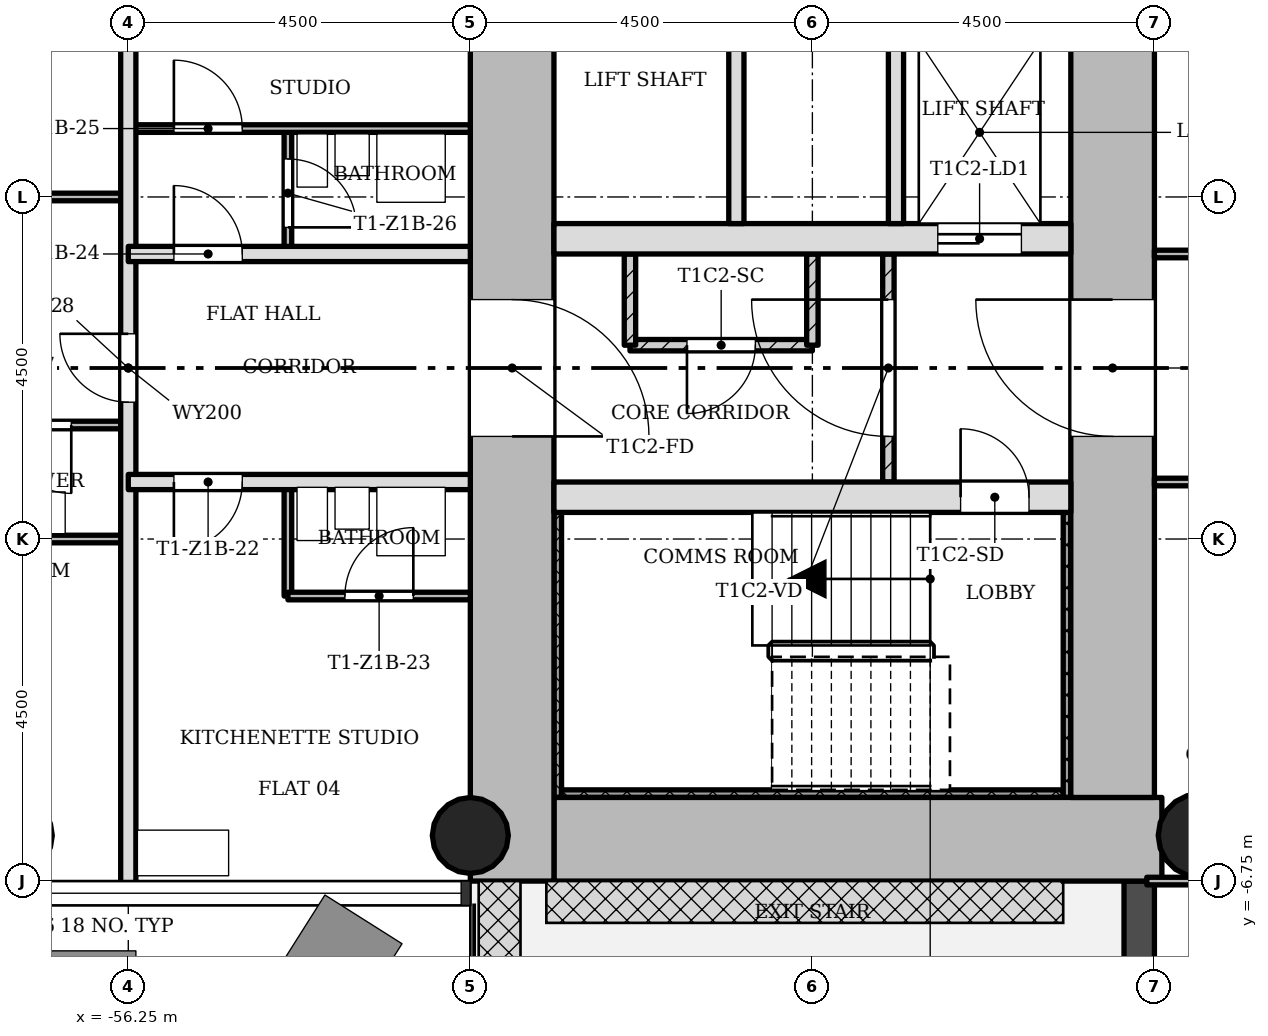
"""IFC4 building model, lengths in metres.
Left out: names, types, materials, properties, quantities, classifications, styles, units other than length and angle.
Written with IfcOpenShell. Run it as: python <this file> out.ifc"""

import sys

from ifc_helpers import new_model, si_unit, direction, frame, frame_2d, origin, origin_2d, place, context, subcontext, project, spatial, rectangle, hollow_circle, extrude, element, fill, save


model = new_model("IFC4")
c1 = context("Model", 3, precision=1e-05, world=origin(), true_north=direction((0.0, 1.0)))
c2 = subcontext(c1, "Body", "Model", "MODEL_VIEW")
j1 = project(units=[si_unit("LENGTHUNIT", "METRE"), si_unit("PLANEANGLEUNIT", "RADIAN")], contexts=[c1])
p1 = place(None, origin())
s1 = spatial("IfcSite", under=j1, at=p1, CompositionType="ELEMENT")
p2 = place(p1, origin())
s2 = spatial("IfcBuilding", under=s1, at=p2, CompositionType="ELEMENT")
p3 = place(p2, frame((0.0, 0.0, 38.1)))
s3 = spatial("IfcBuildingStorey", under=s2, at=p3, CompositionType="ELEMENT", Elevation=38.1)
p4 = place(p3, frame((-50.65, -6.2, 0.0), z_axis=(0.0, 0.0, 1.0), x_axis=(1.0, 0.0, 0.0)))
e1 = element("IfcWall", 1, at=p4, inside=s3, PredefinedType="SHEAR", context=c2, shape_type="SweptSolid", body=[
    extrude(rectangle(XDim=7.998, YDim=1.1, at=frame_2d((3.999, 0.0))), origin(), (0.0, 0.0, 1.0), 3.4),
])
p5 = place(p3, frame((-43.3, -5.65, 0.0), z_axis=(0.0, 0.0, 1.0), x_axis=(0.0, 1.0, 0.0)))
e2 = element("IfcWall", 2, at=p5, inside=s3, PredefinedType="SHEAR", context=c2, shape_type="SweptSolid", body=[
    extrude(rectangle(XDim=12.4, YDim=1.1, at=frame_2d((6.2, 0.0))), origin(), (0.0, 0.0, 1.0), 3.4),
])
p6 = place(p5, frame((4.75, 0.0, 0.0)))
e3 = element("IfcOpeningElement", 3, at=p6, cuts=e2, PredefinedType="OPENING", context=c2, shape_type="SweptSolid", body=[
    extrude(rectangle(XDim=1.8, YDim=2.1, at=frame_2d((0.9, 1.05))), frame((0.0, 0.56, 0.0), z_axis=(0.0, -1.0, 0.0), x_axis=(1.0, 0.0, 0.0)), (0.0, 0.0, 1.0), 1.12),
])
p7 = place(p3, frame((-51.2, 5.65, 0.0), z_axis=(0.0, 0.0, 1.0), x_axis=(0.0, -1.0, 0.0)))
e4 = element("IfcWall", 4, at=p7, inside=s3, PredefinedType="SHEAR", context=c2, shape_type="SweptSolid", body=[
    extrude(rectangle(XDim=12.4, YDim=1.1, at=frame_2d((6.2, 0.0))), origin(), (0.0, 0.0, 1.0), 3.4),
])
p8 = place(p7, frame((4.75, 0.0, 0.0)))
e5 = element("IfcOpeningElement", 5, at=p8, cuts=e4, PredefinedType="OPENING", context=c2, shape_type="SweptSolid", body=[
    extrude(rectangle(XDim=1.8, YDim=2.1, at=frame_2d((0.9, 1.05))), frame((0.0, 0.56, 0.0), z_axis=(0.0, -1.0, 0.0), x_axis=(1.0, 0.0, 0.0)), (0.0, 0.0, 1.0), 1.12),
])
p9 = place(p3, frame((-50.65, -1.7, 0.0), z_axis=(0.0, 0.0, 1.0), x_axis=(1.0, 0.0, 0.0)))
e6 = element("IfcWall", 6, at=p9, inside=s3, PredefinedType="SHEAR", context=c2, shape_type="SweptSolid", body=[
    extrude(rectangle(XDim=6.8, YDim=0.4, at=frame_2d((3.4, 0.0))), origin(), (0.0, 0.0, 1.0), 3.4),
])
p10 = place(p9, frame((5.35, 0.0, 0.0)))
e7 = element("IfcOpeningElement", 7, at=p10, cuts=e6, PredefinedType="OPENING", context=c2, shape_type="SweptSolid", body=[
    extrude(rectangle(XDim=0.9, YDim=2.1, at=frame_2d((0.45, 1.05))), frame((0.0, 0.21, 0.0), z_axis=(0.0, -1.0, 0.0), x_axis=(1.0, 0.0, 0.0)), (0.0, 0.0, 1.0), 0.42),
])
p11 = place(p3, frame((-50.65, 1.7, 0.0), z_axis=(0.0, 0.0, 1.0), x_axis=(1.0, 0.0, 0.0)))
e8 = element("IfcWall", 8, at=p11, inside=s3, PredefinedType="SHEAR", context=c2, shape_type="SweptSolid", body=[
    extrude(rectangle(XDim=6.8, YDim=0.4, at=frame_2d((3.4, 0.0))), origin(), (0.0, 0.0, 1.0), 3.4),
])
p12 = place(p11, frame((5.05, 0.0, 0.0)))
e9 = element("IfcOpeningElement", 9, at=p12, cuts=e8, PredefinedType="OPENING", context=c2, shape_type="SweptSolid", body=[
    extrude(rectangle(XDim=1.1, YDim=2.1, at=frame_2d((0.55, 1.05))), frame((0.0, 0.21, 0.0), z_axis=(0.0, -1.0, 0.0), x_axis=(1.0, 0.0, 0.0)), (0.0, 0.0, 1.0), 0.42),
])
p13 = place(p3, frame((-51.75, -6.15, 0.0), z_axis=(0.0, 0.0, 1.0), x_axis=(1.0, 0.0, 0.0)))
e10 = element("IfcColumn", 10, at=p13, inside=s3, PredefinedType="COLUMN", context=c2, shape_type="SweptSolid", body=[
    extrude(hollow_circle(Radius=0.5, WallThickness=0.036, at=origin_2d()), origin(), (0.0, 0.0, 1.0), 3.4),
])
p14 = place(p3, frame((-42.15, -6.15, 0.0), z_axis=(0.0, 0.0, 1.0), x_axis=(1.0, 0.0, 0.0)))
e11 = element("IfcColumn", 11, at=p14, inside=s3, PredefinedType="COLUMN", context=c2, shape_type="SweptSolid", body=[
    extrude(hollow_circle(Radius=0.55, WallThickness=0.04, at=origin_2d()), origin(), (0.0, 0.0, 1.0), 3.4),
])
p15 = place(p3, frame((-42.95, -6.75, -0.02), z_axis=(0.0, 0.0, 1.0), x_axis=(0.0, -1.0, 0.0)))
e12 = element("IfcWall", 12, at=p15, inside=s3, PredefinedType="STANDARD", context=c2, shape_type="SweptSolid", body=[
    extrude(rectangle(XDim=4.5, YDim=0.4, at=frame_2d((2.25, 0.0))), origin(), (0.0, 0.0, 1.0), 3.12),
])
p16 = place(p15, frame((1.35, 0.0, 0.02)))
e13 = element("IfcOpeningElement", 13, at=p16, cuts=e12, PredefinedType="OPENING", context=c2, shape_type="SweptSolid", body=[
    extrude(rectangle(XDim=1.8, YDim=2.1, at=frame_2d((0.9, 1.05))), frame((0.0, 0.21, 0.0), z_axis=(0.0, -1.0, 0.0), x_axis=(1.0, 0.0, 0.0)), (0.0, 0.0, 1.0), 0.42),
])
p17 = place(p3, frame((-46.25, 1.5, 0.0), z_axis=(0.0, 0.0, 1.0), x_axis=(0.0, -1.0, 0.0)))
e14 = element("IfcWall", 14, at=p17, inside=s3, PredefinedType="PARTITIONING", context=c2, shape_type="SweptSolid", body=[
    extrude(rectangle(XDim=3.0, YDim=0.15, at=frame_2d((1.5, 0.0))), origin(), (0.0, 0.0, 1.0), 3.0),
])
p18 = place(p17, frame((0.6, 0.0, 0.0)))
e15 = element("IfcOpeningElement", 15, at=p18, cuts=e14, PredefinedType="OPENING", context=c2, shape_type="SweptSolid", body=[
    extrude(rectangle(XDim=1.8, YDim=2.1, at=frame_2d((0.9, 1.05))), frame((0.0, 0.085, 0.0), z_axis=(0.0, -1.0, 0.0), x_axis=(1.0, 0.0, 0.0)), (0.0, 0.0, 1.0), 0.17),
])
for number, where, z_axis, x_axis in (
    (16, (-46.15, 5.65, 0.0), (0.0, 0.0, 1.0), (0.0, -1.0, 0.0)),
    (17, (-48.25, 5.65, 0.0), (0.0, 0.0, 1.0), (0.0, -1.0, 0.0)),
):
    element("IfcWall", number, at=place(p3, frame(where, z_axis=z_axis, x_axis=x_axis)), inside=s3, PredefinedType="SOLIDWALL", context=c2, shape_type="SweptSolid", body=[
        extrude(rectangle(XDim=3.75, YDim=0.2, at=frame_2d((1.875, 0.0))), origin(), (0.0, 0.0, 1.0), 3.0),
    ])
p19 = place(p3, frame((-47.25, 0.3, 0.0), z_axis=(0.0, 0.0, 1.0), x_axis=(-1.0, 0.0, 0.0)))
e18 = element("IfcWall", 18, at=p19, inside=s3, PredefinedType="PARTITIONING", context=c2, shape_type="SweptSolid", body=[
    extrude(rectangle(XDim=2.4, YDim=0.15, at=frame_2d((1.2, 0.0))), origin(), (0.0, 0.0, 1.0), 3.0),
])
p20 = place(p19, frame((0.75, 0.0, 0.0)))
e19 = element("IfcOpeningElement", 19, at=p20, cuts=e18, PredefinedType="OPENING", context=c2, shape_type="SweptSolid", body=[
    extrude(rectangle(XDim=0.9, YDim=2.1, at=frame_2d((0.45, 1.05))), frame((0.0, 0.085, 0.0), z_axis=(0.0, -1.0, 0.0), x_axis=(1.0, 0.0, 0.0)), (0.0, 0.0, 1.0), 0.17),
])
for number, where, z_axis, x_axis in (
    (20, (-47.25, 0.3, 0.0), (0.0, 0.0, 1.0), (0.0, 1.0, 0.0)),
    (21, (-49.65, 0.3, 0.0), (0.0, 0.0, 1.0), (0.0, 1.0, 0.0)),
):
    element("IfcWall", number, at=place(p3, frame(where, z_axis=z_axis, x_axis=x_axis)), inside=s3, PredefinedType="PARTITIONING", context=c2, shape_type="SweptSolid", body=[
        extrude(rectangle(XDim=1.2, YDim=0.15, at=frame_2d((0.6, 0.0))), origin(), (0.0, 0.0, 1.0), 3.0),
    ])
p21 = place(p3, frame((-56.25, -6.85, 0.0), z_axis=(0.0, 0.0, 1.0), x_axis=(0.0, 1.0, 0.0)))
e22 = element("IfcWall", 22, at=p21, inside=s3, PredefinedType="SOLIDWALL", context=c2, shape_type="SweptSolid", body=[
    extrude(rectangle(XDim=13.7, YDim=0.2, at=frame_2d((6.85, 0.0))), origin(), (0.0, 0.0, 1.0), 3.0),
])
p22 = place(p21, frame((6.4, 0.0, 0.0)))
e23 = element("IfcOpeningElement", 23, at=p22, cuts=e22, PredefinedType="OPENING", context=c2, shape_type="SweptSolid", body=[
    extrude(rectangle(XDim=0.9, YDim=2.1, at=frame_2d((0.45, 1.05))), frame((0.0, 0.11, 0.0), z_axis=(0.0, -1.0, 0.0), x_axis=(1.0, 0.0, 0.0)), (0.0, 0.0, 1.0), 0.22),
])
p23 = place(p3, frame((-54.15, -3.0, 0.0), z_axis=(0.0, 0.0, 1.0), x_axis=(0.0, 1.0, 0.0)))
e24 = element("IfcWall", 24, at=p23, inside=s3, PredefinedType="PARTITIONING", context=c2, shape_type="SweptSolid", body=[
    extrude(rectangle(XDim=1.5, YDim=0.1, at=frame_2d((0.75, 0.0))), origin(), (0.0, 0.0, 1.0), 3.0),
])
p24 = place(p3, frame((-54.15, 1.5, 0.0), z_axis=(0.0, 0.0, 1.0), x_axis=(0.0, 1.0, 0.0)))
e25 = element("IfcWall", 25, at=p24, inside=s3, PredefinedType="PARTITIONING", context=c2, shape_type="SweptSolid", body=[
    extrude(rectangle(XDim=1.65, YDim=0.1, at=frame_2d((0.825, 0.0))), origin(), (0.0, 0.0, 1.0), 3.0),
])
p25 = place(p24, frame((0.35, 0.0, 0.0)))
e26 = element("IfcOpeningElement", 26, at=p25, cuts=e25, PredefinedType="OPENING", context=c2, shape_type="SweptSolid", body=[
    extrude(rectangle(XDim=0.9, YDim=2.1, at=frame_2d((0.45, 1.05))), frame((0.0, 0.06, 0.0), z_axis=(0.0, -1.0, 0.0), x_axis=(1.0, 0.0, 0.0)), (0.0, 0.0, 1.0), 0.12),
])
p26 = place(p3, frame((-42.85, -6.75, 0.0), z_axis=(0.0, 0.0, 1.0), x_axis=(1.0, 0.0, 0.0)))
e27 = element("IfcWall", 27, at=p26, inside=s3, PredefinedType="PARTITIONING", context=c2, shape_type="SweptSolid", body=[
    extrude(rectangle(XDim=5.95, YDim=0.1, at=frame_2d((2.975, 0.0))), origin(), (0.0, 0.0, 1.0), 3.0),
])
p27 = place(p3, frame((-54.15, -3.0, 0.0), z_axis=(0.0, 0.0, 1.0), x_axis=(1.0, 0.0, 0.0)))
e28 = element("IfcWall", 28, at=p27, inside=s3, PredefinedType="PARTITIONING", context=c2, shape_type="SweptSolid", body=[
    extrude(rectangle(XDim=2.4, YDim=0.1, at=frame_2d((1.2, 0.0))), origin(), (0.0, 0.0, 1.0), 3.0),
])
p28 = place(p27, frame((0.75, 0.0, 0.0)))
e29 = element("IfcOpeningElement", 29, at=p28, cuts=e28, PredefinedType="OPENING", context=c2, shape_type="SweptSolid", body=[
    extrude(rectangle(XDim=0.9, YDim=2.1, at=frame_2d((0.45, 1.05))), frame((0.0, 0.06, 0.0), z_axis=(0.0, -1.0, 0.0), x_axis=(1.0, 0.0, 0.0)), (0.0, 0.0, 1.0), 0.12),
])
p29 = place(p3, frame((-60.85, -2.25, 0.0), z_axis=(0.0, 0.0, 1.0), x_axis=(1.0, 0.0, 0.0)))
e30 = element("IfcWall", 30, at=p29, inside=s3, PredefinedType="PARTITIONING", context=c2, shape_type="SweptSolid", body=[
    extrude(rectangle(XDim=4.6, YDim=0.1, at=frame_2d((2.3, 0.0))), origin(), (0.0, 0.0, 1.0), 3.0),
])
p30 = place(p29, frame((1.25, 0.0, 0.0)))
e31 = element("IfcOpeningElement", 31, at=p30, cuts=e30, PredefinedType="OPENING", context=c2, shape_type="SweptSolid", body=[
    extrude(rectangle(XDim=0.9, YDim=2.1, at=frame_2d((0.45, 1.05))), frame((0.0, 0.06, 0.0), z_axis=(0.0, -1.0, 0.0), x_axis=(1.0, 0.0, 0.0)), (0.0, 0.0, 1.0), 0.12),
])
p31 = place(p3, frame((-42.75, -1.5, 0.0), z_axis=(0.0, 0.0, 1.0), x_axis=(1.0, 0.0, 0.0)))
e32 = element("IfcWall", 32, at=p31, inside=s3, PredefinedType="PARTITIONING", context=c2, shape_type="SweptSolid", body=[
    extrude(rectangle(XDim=5.85, YDim=0.1, at=frame_2d((2.925, 0.0))), origin(), (0.0, 0.0, 1.0), 3.0),
])
p32 = place(p31, frame((2.475, 0.0, 0.0)))
e33 = element("IfcOpeningElement", 33, at=p32, cuts=e32, PredefinedType="OPENING", context=c2, shape_type="SweptSolid", body=[
    extrude(rectangle(XDim=0.9, YDim=2.1, at=frame_2d((0.45, 1.05))), frame((0.0, 0.06, 0.0), z_axis=(0.0, -1.0, 0.0), x_axis=(1.0, 0.0, 0.0)), (0.0, 0.0, 1.0), 0.12),
])
p33 = place(p3, frame((-56.25, -1.5, 0.0), z_axis=(0.0, 0.0, 1.0), x_axis=(1.0, 0.0, 0.0)))
e34 = element("IfcWall", 34, at=p33, inside=s3, PredefinedType="SOLIDWALL", context=c2, shape_type="SweptSolid", body=[
    extrude(rectangle(XDim=4.5, YDim=0.2, at=frame_2d((2.25, 0.0))), origin(), (0.0, 0.0, 1.0), 3.0),
])
p34 = place(p33, frame((0.6, 0.0, 0.0)))
e35 = element("IfcOpeningElement", 35, at=p34, cuts=e34, PredefinedType="OPENING", context=c2, shape_type="SweptSolid", body=[
    extrude(rectangle(XDim=0.9, YDim=2.1, at=frame_2d((0.45, 1.05))), frame((0.0, 0.11, 0.0), z_axis=(0.0, -1.0, 0.0), x_axis=(1.0, 0.0, 0.0)), (0.0, 0.0, 1.0), 0.22),
])
p35 = place(p3, frame((-58.65, -0.75, 0.0), z_axis=(0.0, 0.0, 1.0), x_axis=(1.0, 0.0, 0.0)))
e36 = element("IfcWall", 36, at=p35, inside=s3, PredefinedType="PARTITIONING", context=c2, shape_type="SweptSolid", body=[
    extrude(rectangle(XDim=2.4, YDim=0.1, at=frame_2d((1.2, 0.0))), origin(), (0.0, 0.0, 1.0), 3.0),
])
p36 = place(p35, frame((0.75, 0.0, 0.0)))
e37 = element("IfcOpeningElement", 37, at=p36, cuts=e36, PredefinedType="OPENING", context=c2, shape_type="SweptSolid", body=[
    extrude(rectangle(XDim=0.9, YDim=2.1, at=frame_2d((0.45, 1.05))), frame((0.0, 0.06, 0.0), z_axis=(0.0, -1.0, 0.0), x_axis=(1.0, 0.0, 0.0)), (0.0, 0.0, 1.0), 0.12),
])
p37 = place(p3, frame((-42.75, 1.5, 0.0), z_axis=(0.0, 0.0, 1.0), x_axis=(1.0, 0.0, 0.0)))
e38 = element("IfcWall", 38, at=p37, inside=s3, PredefinedType="PARTITIONING", context=c2, shape_type="SweptSolid", body=[
    extrude(rectangle(XDim=5.85, YDim=0.1, at=frame_2d((2.925, 0.0))), origin(), (0.0, 0.0, 1.0), 3.0),
])
p38 = place(p37, frame((2.475, 0.0, 0.0)))
e39 = element("IfcOpeningElement", 39, at=p38, cuts=e38, PredefinedType="OPENING", context=c2, shape_type="SweptSolid", body=[
    extrude(rectangle(XDim=0.9, YDim=2.1, at=frame_2d((0.45, 1.05))), frame((0.0, 0.06, 0.0), z_axis=(0.0, -1.0, 0.0), x_axis=(1.0, 0.0, 0.0)), (0.0, 0.0, 1.0), 0.12),
])
p39 = place(p3, frame((-56.25, 1.5, 0.0), z_axis=(0.0, 0.0, 1.0), x_axis=(1.0, 0.0, 0.0)))
e40 = element("IfcWall", 40, at=p39, inside=s3, PredefinedType="SOLIDWALL", context=c2, shape_type="SweptSolid", body=[
    extrude(rectangle(XDim=4.5, YDim=0.2, at=frame_2d((2.25, 0.0))), origin(), (0.0, 0.0, 1.0), 3.0),
])
p40 = place(p39, frame((0.6, 0.0, 0.0)))
e41 = element("IfcOpeningElement", 41, at=p40, cuts=e40, PredefinedType="OPENING", context=c2, shape_type="SweptSolid", body=[
    extrude(rectangle(XDim=0.9, YDim=2.1, at=frame_2d((0.45, 1.05))), frame((0.0, 0.11, 0.0), z_axis=(0.0, -1.0, 0.0), x_axis=(1.0, 0.0, 0.0)), (0.0, 0.0, 1.0), 0.22),
])
p41 = place(p3, frame((-60.85, 2.25, 0.0), z_axis=(0.0, 0.0, 1.0), x_axis=(1.0, 0.0, 0.0)))
e42 = element("IfcWall", 42, at=p41, inside=s3, PredefinedType="PARTITIONING", context=c2, shape_type="SweptSolid", body=[
    extrude(rectangle(XDim=4.6, YDim=0.1, at=frame_2d((2.3, 0.0))), origin(), (0.0, 0.0, 1.0), 3.0),
])
p42 = place(p41, frame((1.9, 0.0, 0.0)))
e43 = element("IfcOpeningElement", 43, at=p42, cuts=e42, PredefinedType="OPENING", context=c2, shape_type="SweptSolid", body=[
    extrude(rectangle(XDim=0.9, YDim=2.1, at=frame_2d((0.45, 1.05))), frame((0.0, 0.06, 0.0), z_axis=(0.0, -1.0, 0.0), x_axis=(1.0, 0.0, 0.0)), (0.0, 0.0, 1.0), 0.12),
])
p43 = place(p3, frame((-56.25, 3.15, 0.0), z_axis=(0.0, 0.0, 1.0), x_axis=(1.0, 0.0, 0.0)))
e44 = element("IfcWall", 44, at=p43, inside=s3, PredefinedType="PARTITIONING", context=c2, shape_type="SweptSolid", body=[
    extrude(rectangle(XDim=4.5, YDim=0.1, at=frame_2d((2.25, 0.0))), origin(), (0.0, 0.0, 1.0), 3.0),
])
p44 = place(p43, frame((0.6, 0.0, 0.0)))
e45 = element("IfcOpeningElement", 45, at=p44, cuts=e44, PredefinedType="OPENING", context=c2, shape_type="SweptSolid", body=[
    extrude(rectangle(XDim=0.9, YDim=2.1, at=frame_2d((0.45, 1.05))), frame((0.0, 0.06, 0.0), z_axis=(0.0, -1.0, 0.0), x_axis=(1.0, 0.0, 0.0)), (0.0, 0.0, 1.0), 0.12),
])
p45 = place(p3, frame((-50.6, -1.9, 0.0), z_axis=(0.0, 0.0, 1.0), x_axis=(0.0, -1.0, 0.0)))
e46 = element("IfcWall", 46, at=p45, inside=s3, PredefinedType="SHEAR", context=c2, shape_type="SweptSolid", body=[
    extrude(rectangle(XDim=3.75, YDim=0.1, at=frame_2d((1.875, 0.0))), origin(), (0.0, 0.0, 1.0), 3.4),
])
p46 = place(p3, frame((-43.95, -5.6, 0.0), z_axis=(0.0, 0.0, 1.0), x_axis=(-1.0, 0.0, 0.0)))
e47 = element("IfcWall", 47, at=p46, inside=s3, PredefinedType="SHEAR", context=c2, shape_type="SweptSolid", body=[
    extrude(rectangle(XDim=6.6, YDim=0.1, at=frame_2d((3.3, 0.0))), origin(), (0.0, 0.0, 1.0), 3.4),
])
p47 = place(p3, frame((-43.9, -1.9, 0.0), z_axis=(0.0, 0.0, 1.0), x_axis=(0.0, -1.0, 0.0)))
e48 = element("IfcWall", 48, at=p47, inside=s3, PredefinedType="SHEAR", context=c2, shape_type="SweptSolid", body=[
    extrude(rectangle(XDim=3.75, YDim=0.1, at=frame_2d((1.875, 0.0))), origin(), (0.0, 0.0, 1.0), 3.4),
])
p48 = place(p18, origin())
e49 = element("IfcDoor", 49, at=p48, inside=s3, OperationType="SINGLE_SWING_LEFT", PredefinedType="DOOR", context=c2, shape_type="SweptSolid", body=[
    extrude(rectangle(XDim=1.8, YDim=2.1, at=frame_2d((0.9, 1.05))), frame((0.0, 0.025, 0.0), z_axis=(0.0, -1.0, 0.0), x_axis=(1.0, 0.0, 0.0)), (0.0, 0.0, 1.0), 0.05),
])
fill(e15, e49)
p49 = place(p20, origin())
e50 = element("IfcDoor", 50, at=p49, inside=s3, OperationType="SINGLE_SWING_LEFT", PredefinedType="DOOR", context=c2, shape_type="SweptSolid", body=[
    extrude(rectangle(XDim=0.9, YDim=2.1, at=frame_2d((0.45, 1.05))), frame((0.0, 0.025, 0.0), z_axis=(0.0, -1.0, 0.0), x_axis=(1.0, 0.0, 0.0)), (0.0, 0.0, 1.0), 0.05),
])
fill(e19, e50)
p50 = place(p34, origin())
e51 = element("IfcDoor", 51, at=p50, inside=s3, OperationType="SINGLE_SWING_LEFT", PredefinedType="DOOR", context=c2, shape_type="SweptSolid", body=[
    extrude(rectangle(XDim=0.9, YDim=2.1, at=frame_2d((0.45, 1.05))), frame((0.0, 0.025, 0.0), z_axis=(0.0, -1.0, 0.0), x_axis=(1.0, 0.0, 0.0)), (0.0, 0.0, 1.0), 0.05),
])
fill(e35, e51)
p51 = place(p28, origin())
e52 = element("IfcDoor", 52, at=p51, inside=s3, OperationType="SINGLE_SWING_LEFT", PredefinedType="DOOR", context=c2, shape_type="SweptSolid", body=[
    extrude(rectangle(XDim=0.9, YDim=2.1, at=frame_2d((0.45, 1.05))), frame((0.0, 0.025, 0.0), z_axis=(0.0, -1.0, 0.0), x_axis=(1.0, 0.0, 0.0)), (0.0, 0.0, 1.0), 0.05),
])
fill(e29, e52)
p52 = place(p40, origin())
e53 = element("IfcDoor", 53, at=p52, inside=s3, OperationType="SINGLE_SWING_RIGHT", PredefinedType="DOOR", context=c2, shape_type="SweptSolid", body=[
    extrude(rectangle(XDim=0.9, YDim=2.1, at=frame_2d((0.45, 1.05))), frame((0.0, 0.025, 0.0), z_axis=(0.0, -1.0, 0.0), x_axis=(1.0, 0.0, 0.0)), (0.0, 0.0, 1.0), 0.05),
])
fill(e41, e53)
p53 = place(p44, origin())
e54 = element("IfcDoor", 54, at=p53, inside=s3, OperationType="SINGLE_SWING_RIGHT", PredefinedType="DOOR", context=c2, shape_type="SweptSolid", body=[
    extrude(rectangle(XDim=0.9, YDim=2.1, at=frame_2d((0.45, 1.05))), frame((0.0, 0.025, 0.0), z_axis=(0.0, -1.0, 0.0), x_axis=(1.0, 0.0, 0.0)), (0.0, 0.0, 1.0), 0.05),
])
fill(e45, e54)
p54 = place(p25, origin())
e55 = element("IfcDoor", 55, at=p54, inside=s3, OperationType="SINGLE_SWING_LEFT", PredefinedType="DOOR", context=c2, shape_type="SweptSolid", body=[
    extrude(rectangle(XDim=0.9, YDim=2.1, at=frame_2d((0.45, 1.05))), frame((0.0, 0.025, 0.0), z_axis=(0.0, -1.0, 0.0), x_axis=(1.0, 0.0, 0.0)), (0.0, 0.0, 1.0), 0.05),
])
fill(e26, e55)
p55 = place(p36, origin())
e56 = element("IfcDoor", 56, at=p55, inside=s3, OperationType="SINGLE_SWING_RIGHT", PredefinedType="DOOR", context=c2, shape_type="SweptSolid", body=[
    extrude(rectangle(XDim=0.9, YDim=2.1, at=frame_2d((0.45, 1.05))), frame((0.0, 0.025, 0.0), z_axis=(0.0, -1.0, 0.0), x_axis=(1.0, 0.0, 0.0)), (0.0, 0.0, 1.0), 0.05),
])
fill(e37, e56)
p56 = place(p22, origin())
e57 = element("IfcDoor", 57, at=p56, inside=s3, OperationType="SINGLE_SWING_LEFT", PredefinedType="DOOR", context=c2, shape_type="SweptSolid", body=[
    extrude(rectangle(XDim=0.9, YDim=2.1, at=frame_2d((0.45, 1.05))), frame((0.0, 0.025, 0.0), z_axis=(0.0, -1.0, 0.0), x_axis=(1.0, 0.0, 0.0)), (0.0, 0.0, 1.0), 0.05),
])
fill(e23, e57)
p57 = place(p10, origin())
e58 = element("IfcDoor", 58, at=p57, inside=s3, OperationType="SINGLE_SWING_RIGHT", PredefinedType="DOOR", context=c2, shape_type="SweptSolid", body=[
    extrude(rectangle(XDim=0.9, YDim=2.1, at=frame_2d((0.45, 1.05))), frame((0.0, 0.025, 0.0), z_axis=(0.0, -1.0, 0.0), x_axis=(1.0, 0.0, 0.0)), (0.0, 0.0, 1.0), 0.05),
])
fill(e7, e58)
p58 = place(p12, origin())
e59 = element("IfcDoor", 59, at=p58, inside=s3, OperationType="SLIDING_TO_LEFT", PredefinedType="DOOR", context=c2, shape_type="SweptSolid", body=[
    extrude(rectangle(XDim=1.1, YDim=2.1, at=frame_2d((0.55, 1.05))), frame((0.0, 0.025, 0.0), z_axis=(0.0, -1.0, 0.0), x_axis=(1.0, 0.0, 0.0)), (0.0, 0.0, 1.0), 0.05),
])
fill(e9, e59)
p59 = place(p6, origin())
e60 = element("IfcDoor", 60, at=p59, inside=s3, OperationType="SINGLE_SWING_LEFT", PredefinedType="DOOR", context=c2, shape_type="SweptSolid", body=[
    extrude(rectangle(XDim=1.8, YDim=2.1, at=frame_2d((0.9, 1.05))), frame((0.0, 0.025, 0.0), z_axis=(0.0, -1.0, 0.0), x_axis=(1.0, 0.0, 0.0)), (0.0, 0.0, 1.0), 0.05),
])
fill(e3, e60)
p60 = place(p8, origin())
e61 = element("IfcDoor", 61, at=p60, inside=s3, OperationType="SINGLE_SWING_LEFT", PredefinedType="DOOR", context=c2, shape_type="SweptSolid", body=[
    extrude(rectangle(XDim=1.8, YDim=2.1, at=frame_2d((0.9, 1.05))), frame((0.0, 0.025, 0.0), z_axis=(0.0, -1.0, 0.0), x_axis=(1.0, 0.0, 0.0)), (0.0, 0.0, 1.0), 0.05),
])
fill(e5, e61)
save(model, sys.argv[1])
